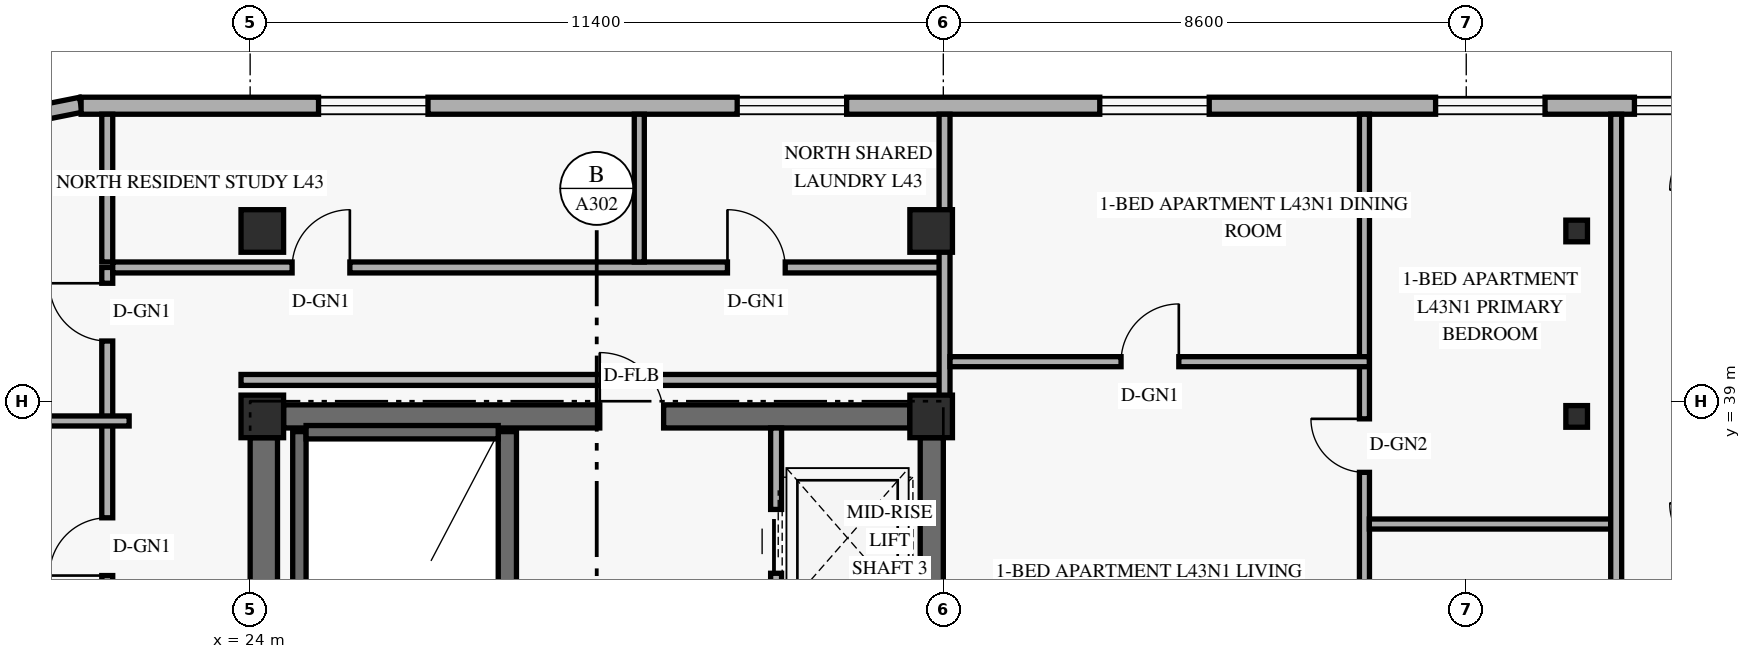
"""IFC4 building model, lengths in metres.
Left out: names, types, materials, properties, quantities, classifications, styles, units other than length and angle.
Written with IfcOpenShell. Run it as: python <this file> out.ifc"""

import sys

from ifc_helpers import new_model, si_unit, direction, frame, frame_2d, origin, origin_2d, place, context, subcontext, project, spatial, rectangle, hollow_rectangle, extrude, element, fill, save


model = new_model("IFC4")
c1 = context("Model", 3, precision=1e-05, world=origin(), true_north=direction((0.0, 1.0)))
c2 = subcontext(c1, "Body", "Model", "MODEL_VIEW")
j1 = project(units=[si_unit("LENGTHUNIT", "METRE"), si_unit("PLANEANGLEUNIT", "RADIAN")], contexts=[c1])
p1 = place(None, origin())
s1 = spatial("IfcSite", under=j1, at=p1, CompositionType="ELEMENT")
p2 = place(p1, origin())
s2 = spatial("IfcBuilding", under=s1, at=p2, CompositionType="ELEMENT")
p3 = place(p2, frame((0.0, 0.0, 166.2)))
s3 = spatial("IfcBuildingStorey", under=s2, at=p3, CompositionType="ELEMENT", Elevation=166.2)
p4 = place(p3, frame((24.225, 30.55, 0.0), z_axis=(0.0, 0.0, 1.0), x_axis=(0.0, 1.0, 0.0)))
e1 = element("IfcWall", 1, at=p4, inside=s3, PredefinedType="SHEAR", context=c2, shape_type="SweptSolid", body=[
    extrude(rectangle(XDim=7.85, YDim=0.45, at=frame_2d((3.925, 0.0))), origin(), (0.0, 0.0, 1.0), 2.748),
])
p5 = place(p3, frame((35.21, 31.35, 0.0), z_axis=(0.0, 0.0, 1.0), x_axis=(0.0, 1.0, 0.0)))
e2 = element("IfcWall", 2, at=p5, inside=s3, PredefinedType="SHEAR", context=c2, shape_type="SweptSolid", body=[
    extrude(rectangle(XDim=7.05, YDim=0.38, at=frame_2d((3.525, 0.0))), origin(), (0.0, 0.0, 1.0), 2.748),
])
p6 = place(p3, frame((24.55, 38.75, 0.0), z_axis=(0.0, 0.0, 1.0), x_axis=(1.0, 0.0, 0.0)))
e3 = element("IfcWall", 3, at=p6, inside=s3, PredefinedType="SHEAR", context=c2, shape_type="SweptSolid", body=[
    extrude(rectangle(XDim=10.3, YDim=0.38, at=frame_2d((5.15, 0.0))), origin(), (0.0, 0.0, 1.0), 3.36),
])
p7 = place(p6, frame((5.2, 0.0, 0.0)))
e4 = element("IfcOpeningElement", 4, at=p7, cuts=e3, PredefinedType="OPENING", context=c2, shape_type="SweptSolid", body=[
    extrude(rectangle(XDim=1.05, YDim=2.15, at=frame_2d((0.525, 1.075))), frame((0.0, 0.2, 0.0), z_axis=(0.0, -1.0, 0.0), x_axis=(1.0, 0.0, 0.0)), (0.0, 0.0, 1.0), 0.4),
])
p8 = place(p3, frame((24.81, 30.74, 0.0), z_axis=(0.0, 0.0, 1.0), x_axis=(0.0, 1.0, 0.0)))
e5 = element("IfcWall", 5, at=p8, inside=s3, PredefinedType="SHEAR", context=c2, shape_type="SweptSolid", body=[
    extrude(rectangle(XDim=7.76, YDim=0.22, at=frame_2d((3.88, 0.0))), origin(), (0.0, 0.0, 1.0), 3.36),
])
p9 = place(p3, frame((28.23, 30.74, 0.0), z_axis=(0.0, 0.0, 1.0), x_axis=(0.0, 1.0, 0.0)))
e6 = element("IfcWall", 6, at=p9, inside=s3, PredefinedType="SHEAR", context=c2, shape_type="SweptSolid", body=[
    extrude(rectangle(XDim=7.76, YDim=0.3, at=frame_2d((3.88, 0.0))), origin(), (0.0, 0.0, 1.0), 3.36),
])
p10 = place(p3, frame((24.92, 38.49, 0.0), z_axis=(0.0, 0.0, 1.0), x_axis=(1.0, 0.0, 0.0)))
e7 = element("IfcWall", 7, at=p10, inside=s3, PredefinedType="SHEAR", context=c2, shape_type="SweptSolid", body=[
    extrude(rectangle(XDim=3.16, YDim=0.22, at=frame_2d((1.58, 0.0))), origin(), (0.0, 0.0, 1.0), 3.36),
])
for number, where, z_axis, x_axis in (
    (8, (24.2, 38.75, 0.0), (0.0, 0.0, 1.0), (1.0, 0.0, 0.0)),
    (9, (24.2, 41.8, 0.0), (0.0, 0.0, 1.0), (1.0, 0.0, 0.0)),
    (10, (35.2, 38.75, 0.0), (0.0, 0.0, 1.0), (1.0, 0.0, 0.0)),
    (11, (35.2, 41.8, 0.0), (0.0, 0.0, 1.0), (1.0, 0.0, 0.0)),
):
    element("IfcColumn", number, at=place(p3, frame(where, z_axis=z_axis, x_axis=x_axis)), inside=s3, PredefinedType="COLUMN", context=c2, shape_type="SweptSolid", body=[
        extrude(rectangle(XDim=0.7, YDim=0.7, at=origin_2d()), origin(), (0.0, 0.0, 1.0), 3.6),
    ])
for number, where, z_axis, x_axis in (
    (12, (45.753, 38.75, 0.0), (0.035, 0.0, 0.999), (0.0, 1.0, 0.0)),
    (13, (45.753, 41.8, 0.0), (0.035, 0.0, 0.999), (0.0, 1.0, 0.0)),
):
    element("IfcColumn", number, at=place(p3, frame(where, z_axis=z_axis, x_axis=x_axis)), inside=s3, PredefinedType="COLUMN", context=c2, shape_type="SweptSolid", body=[
        extrude(hollow_rectangle(XDim=0.356, YDim=0.356, WallThickness=0.016, at=origin_2d()), origin(), (0.0, 0.0, 1.0), 3.602),
    ])
p11 = place(p3, frame((21.217, 43.876, 0.0), z_axis=(0.0, 0.0, 1.0), x_axis=(-0.980809899341, -0.19496651342, 0.0)))
e14 = element("IfcWall", 14, at=p11, inside=s3, PredefinedType="SOLIDWALL", context=c2, shape_type="SweptSolid", body=[
    extrude(rectangle(XDim=1.389, YDim=0.25, at=frame_2d((0.694, 0.0))), origin(), (0.0, 0.0, 1.0), 3.36),
])
p12 = place(p3, frame((54.98, 43.86, 0.0), z_axis=(0.0, 0.0, 1.0), x_axis=(-1.0, 0.0, 0.0)))
e15 = element("IfcWall", 15, at=p12, inside=s3, PredefinedType="SOLIDWALL", context=c2, shape_type="SweptSolid", body=[
    extrude(rectangle(XDim=33.76, YDim=0.28, at=frame_2d((16.88, 0.0))), origin(), (0.0, 0.0, 1.0), 3.36),
])
p13 = place(p12, frame((28.055, 0.0, 0.85)))
e16 = element("IfcOpeningElement", 16, at=p13, cuts=e15, PredefinedType="OPENING", context=c2, shape_type="SweptSolid", body=[
    extrude(rectangle(XDim=1.8, YDim=1.6, at=frame_2d((0.9, 0.8))), frame((0.0, 0.15, 0.0), z_axis=(0.0, -1.0, 0.0), x_axis=(1.0, 0.0, 0.0)), (0.0, 0.0, 1.0), 0.3),
])
p14 = place(p12, frame((21.17, 0.0, 0.85)))
e17 = element("IfcOpeningElement", 17, at=p14, cuts=e15, PredefinedType="OPENING", context=c2, shape_type="SweptSolid", body=[
    extrude(rectangle(XDim=1.8, YDim=1.6, at=frame_2d((0.9, 0.8))), frame((0.0, 0.15, 0.0), z_axis=(0.0, -1.0, 0.0), x_axis=(1.0, 0.0, 0.0)), (0.0, 0.0, 1.0), 0.3),
])
p15 = place(p12, frame((15.207, 0.0, 0.85)))
e18 = element("IfcOpeningElement", 18, at=p15, cuts=e15, PredefinedType="OPENING", context=c2, shape_type="SweptSolid", body=[
    extrude(rectangle(XDim=1.8, YDim=1.6, at=frame_2d((0.9, 0.8))), frame((0.0, 0.15, 0.0), z_axis=(0.0, -1.0, 0.0), x_axis=(1.0, 0.0, 0.0)), (0.0, 0.0, 1.0), 0.3),
])
p16 = place(p12, frame((9.684, 0.0, 0.85)))
e19 = element("IfcOpeningElement", 19, at=p16, cuts=e15, PredefinedType="OPENING", context=c2, shape_type="SweptSolid", body=[
    extrude(rectangle(XDim=1.8, YDim=1.6, at=frame_2d((0.9, 0.8))), frame((0.0, 0.15, 0.0), z_axis=(0.0, -1.0, 0.0), x_axis=(1.0, 0.0, 0.0)), (0.0, 0.0, 1.0), 0.3),
])
p17 = place(p12, frame((7.014, 0.0, 0.85)))
e20 = element("IfcOpeningElement", 20, at=p17, cuts=e15, PredefinedType="OPENING", context=c2, shape_type="SweptSolid", body=[
    extrude(rectangle(XDim=1.2, YDim=1.5, at=frame_2d((0.6, 0.75))), frame((0.0, 0.15, 0.0), z_axis=(0.0, -1.0, 0.0), x_axis=(1.0, 0.0, 0.0)), (0.0, 0.0, 1.0), 0.3),
])
p18 = place(p12, frame((2.457, 0.0, 0.85)))
e21 = element("IfcOpeningElement", 21, at=p18, cuts=e15, PredefinedType="OPENING", context=c2, shape_type="SweptSolid", body=[
    extrude(rectangle(XDim=1.8, YDim=1.6, at=frame_2d((0.9, 0.8))), frame((0.0, 0.15, 0.0), z_axis=(0.0, -1.0, 0.0), x_axis=(1.0, 0.0, 0.0)), (0.0, 0.0, 1.0), 0.3),
])
p19 = place(p3, frame((32.65, 31.35, 0.0), z_axis=(0.0, 0.0, 1.0), x_axis=(0.0, 1.0, 0.0)))
e22 = element("IfcWall", 22, at=p19, inside=s3, PredefinedType="STANDARD", context=c2, shape_type="SweptSolid", body=[
    extrude(rectangle(XDim=7.21, YDim=0.18, at=frame_2d((3.605, 0.0))), origin(), (0.0, 0.0, 1.0), 3.36),
])
p20 = place(p19, frame((0.52, 0.0, 0.0)))
e23 = element("IfcOpeningElement", 23, at=p20, cuts=e22, PredefinedType="OPENING", context=c2, shape_type="SweptSolid", body=[
    extrude(rectangle(XDim=1.05, YDim=2.2, at=frame_2d((0.525, 1.1))), frame((0.0, 0.1, 0.0), z_axis=(0.0, -1.0, 0.0), x_axis=(1.0, 0.0, 0.0)), (0.0, 0.0, 1.0), 0.2),
])
p21 = place(p19, frame((2.67, 0.0, 0.0)))
e24 = element("IfcOpeningElement", 24, at=p21, cuts=e22, PredefinedType="OPENING", context=c2, shape_type="SweptSolid", body=[
    extrude(rectangle(XDim=1.05, YDim=2.2, at=frame_2d((0.525, 1.1))), frame((0.0, 0.1, 0.0), z_axis=(0.0, -1.0, 0.0), x_axis=(1.0, 0.0, 0.0)), (0.0, 0.0, 1.0), 0.2),
])
p22 = place(p19, frame((4.82, 0.0, 0.0)))
e25 = element("IfcOpeningElement", 25, at=p22, cuts=e22, PredefinedType="OPENING", context=c2, shape_type="SweptSolid", body=[
    extrude(rectangle(XDim=1.05, YDim=2.2, at=frame_2d((0.525, 1.1))), frame((0.0, 0.1, 0.0), z_axis=(0.0, -1.0, 0.0), x_axis=(1.0, 0.0, 0.0)), (0.0, 0.0, 1.0), 0.2),
])
p23 = place(p3, frame((21.65, 6.8, 0.0), z_axis=(0.0, 0.0, 1.0), x_axis=(0.0, 1.0, 0.0)))
e26 = element("IfcWall", 26, at=p23, inside=s3, PredefinedType="STANDARD", context=c2, shape_type="SweptSolid", body=[
    extrude(rectangle(XDim=34.4, YDim=0.18, at=frame_2d((17.2, 0.0))), origin(), (0.0, 0.0, 1.0), 2.73),
])
p24 = place(p23, frame((0.3, 0.0, 0.0)))
e27 = element("IfcOpeningElement", 27, at=p24, cuts=e26, PredefinedType="OPENING", context=c2, shape_type="SweptSolid", body=[
    extrude(rectangle(XDim=0.95, YDim=2.15, at=frame_2d((0.475, 1.075))), frame((0.0, 0.1, 0.0), z_axis=(0.0, -1.0, 0.0), x_axis=(1.0, 0.0, 0.0)), (0.0, 0.0, 1.0), 0.2),
])
p25 = place(p23, frame((3.718, 0.0, 0.0)))
e28 = element("IfcOpeningElement", 28, at=p25, cuts=e26, PredefinedType="OPENING", context=c2, shape_type="SweptSolid", body=[
    extrude(rectangle(XDim=0.95, YDim=2.15, at=frame_2d((0.475, 1.075))), frame((0.0, 0.1, 0.0), z_axis=(0.0, -1.0, 0.0), x_axis=(1.0, 0.0, 0.0)), (0.0, 0.0, 1.0), 0.2),
])
p26 = place(p23, frame((8.995, 0.0, 0.0)))
e29 = element("IfcOpeningElement", 29, at=p26, cuts=e26, PredefinedType="OPENING", context=c2, shape_type="SweptSolid", body=[
    extrude(rectangle(XDim=0.95, YDim=2.15, at=frame_2d((0.475, 1.075))), frame((0.0, 0.1, 0.0), z_axis=(0.0, -1.0, 0.0), x_axis=(1.0, 0.0, 0.0)), (0.0, 0.0, 1.0), 0.2),
])
p27 = place(p23, frame((14.105, 0.0, 0.0)))
e30 = element("IfcOpeningElement", 30, at=p27, cuts=e26, PredefinedType="OPENING", context=c2, shape_type="SweptSolid", body=[
    extrude(rectangle(XDim=0.95, YDim=2.15, at=frame_2d((0.475, 1.075))), frame((0.0, 0.1, 0.0), z_axis=(0.0, -1.0, 0.0), x_axis=(1.0, 0.0, 0.0)), (0.0, 0.0, 1.0), 0.2),
])
p28 = place(p23, frame((19.62, 0.0, 0.0)))
e31 = element("IfcOpeningElement", 31, at=p28, cuts=e26, PredefinedType="OPENING", context=c2, shape_type="SweptSolid", body=[
    extrude(rectangle(XDim=0.95, YDim=2.15, at=frame_2d((0.475, 1.075))), frame((0.0, 0.1, 0.0), z_axis=(0.0, -1.0, 0.0), x_axis=(1.0, 0.0, 0.0)), (0.0, 0.0, 1.0), 0.2),
])
p29 = place(p23, frame((24.73, 0.0, 0.0)))
e32 = element("IfcOpeningElement", 32, at=p29, cuts=e26, PredefinedType="OPENING", context=c2, shape_type="SweptSolid", body=[
    extrude(rectangle(XDim=0.95, YDim=2.15, at=frame_2d((0.475, 1.075))), frame((0.0, 0.1, 0.0), z_axis=(0.0, -1.0, 0.0), x_axis=(1.0, 0.0, 0.0)), (0.0, 0.0, 1.0), 0.2),
])
p30 = place(p23, frame((29.333, 0.0, 0.0)))
e33 = element("IfcOpeningElement", 33, at=p30, cuts=e26, PredefinedType="OPENING", context=c2, shape_type="SweptSolid", body=[
    extrude(rectangle(XDim=0.95, YDim=2.15, at=frame_2d((0.475, 1.075))), frame((0.0, 0.1, 0.0), z_axis=(0.0, -1.0, 0.0), x_axis=(1.0, 0.0, 0.0)), (0.0, 0.0, 1.0), 0.2),
])
p31 = place(p23, frame((33.19, 0.0, 0.0)))
e34 = element("IfcOpeningElement", 34, at=p31, cuts=e26, PredefinedType="OPENING", context=c2, shape_type="SweptSolid", body=[
    extrude(rectangle(XDim=0.95, YDim=2.15, at=frame_2d((0.475, 1.075))), frame((0.0, 0.1, 0.0), z_axis=(0.0, -1.0, 0.0), x_axis=(1.0, 0.0, 0.0)), (0.0, 0.0, 1.0), 0.2),
])
p32 = place(p3, frame((21.74, 41.2, 0.0), z_axis=(0.0, 0.0, 1.0), x_axis=(1.0, 0.0, 0.0)))
e35 = element("IfcWall", 35, at=p32, inside=s3, PredefinedType="STANDARD", context=c2, shape_type="SweptSolid", body=[
    extrude(rectangle(XDim=13.68, YDim=0.18, at=frame_2d((6.84, 0.0))), origin(), (0.0, 0.0, 1.0), 2.73),
])
p33 = place(p32, frame((2.95, 0.0, 0.0)))
e36 = element("IfcOpeningElement", 36, at=p33, cuts=e35, PredefinedType="OPENING", context=c2, shape_type="SweptSolid", body=[
    extrude(rectangle(XDim=0.95, YDim=2.15, at=frame_2d((0.475, 1.075))), frame((0.0, 0.1, 0.0), z_axis=(0.0, -1.0, 0.0), x_axis=(1.0, 0.0, 0.0)), (0.0, 0.0, 1.0), 0.2),
])
p34 = place(p32, frame((10.11, 0.0, 0.0)))
e37 = element("IfcOpeningElement", 37, at=p34, cuts=e35, PredefinedType="OPENING", context=c2, shape_type="SweptSolid", body=[
    extrude(rectangle(XDim=0.95, YDim=2.15, at=frame_2d((0.475, 1.075))), frame((0.0, 0.1, 0.0), z_axis=(0.0, -1.0, 0.0), x_axis=(1.0, 0.0, 0.0)), (0.0, 0.0, 1.0), 0.2),
])
p35 = place(p3, frame((23.85, 39.35, 0.0), z_axis=(0.0, 0.0, 1.0), x_axis=(1.0, 0.0, 0.0)))
e38 = element("IfcWall", 38, at=p35, inside=s3, PredefinedType="STANDARD", context=c2, shape_type="SweptSolid", body=[
    extrude(rectangle(XDim=11.57, YDim=0.18, at=frame_2d((5.785, 0.0))), origin(), (0.0, 0.0, 1.0), 2.73),
])
p36 = place(p3, frame((21.65, 41.29, 0.0), z_axis=(0.0, 0.0, 1.0), x_axis=(0.0, 1.0, 0.0)))
e39 = element("IfcWall", 39, at=p36, inside=s3, PredefinedType="PARTITIONING", context=c2, shape_type="SweptSolid", body=[
    extrude(rectangle(XDim=2.43, YDim=0.18, at=frame_2d((1.215, 0.0))), origin(), (0.0, 0.0, 1.0), 2.879),
])
p37 = place(p3, frame((35.42, 38.75, 0.0), z_axis=(0.0, 0.0, 1.0), x_axis=(0.0, 1.0, 0.0)))
e40 = element("IfcWall", 40, at=p37, inside=s3, PredefinedType="PARTITIONING", context=c2, shape_type="SweptSolid", body=[
    extrude(rectangle(XDim=4.97, YDim=0.18, at=frame_2d((2.485, 0.0))), origin(), (0.0, 0.0, 1.0), 2.73),
])
p38 = place(p3, frame((42.326, 29.55, 0.0), z_axis=(0.0, 0.0, 1.0), x_axis=(0.0, 1.0, 0.0)))
e41 = element("IfcWall", 41, at=p38, inside=s3, PredefinedType="PARTITIONING", context=c2, shape_type="SweptSolid", body=[
    extrude(rectangle(XDim=14.17, YDim=0.165, at=frame_2d((7.085, 0.0))), origin(), (0.0, 0.0, 1.0), 2.73),
])
p39 = place(p38, frame((4.593, 0.0, 0.0)))
e42 = element("IfcOpeningElement", 42, at=p39, cuts=e41, PredefinedType="OPENING", context=c2, shape_type="SweptSolid", body=[
    extrude(rectangle(XDim=0.88, YDim=2.14, at=frame_2d((0.44, 1.07))), frame((0.0, 0.093, 0.0), z_axis=(0.0, -1.0, 0.0), x_axis=(1.0, 0.0, 0.0)), (0.0, 0.0, 1.0), 0.185),
])
p40 = place(p38, frame((8.28, 0.0, 0.0)))
e43 = element("IfcOpeningElement", 43, at=p40, cuts=e41, PredefinedType="OPENING", context=c2, shape_type="SweptSolid", body=[
    extrude(rectangle(XDim=0.88, YDim=2.12, at=frame_2d((0.44, 1.06))), frame((0.0, 0.093, 0.0), z_axis=(0.0, -1.0, 0.0), x_axis=(1.0, 0.0, 0.0)), (0.0, 0.0, 1.0), 0.185),
])
p41 = place(p3, frame((35.51, 39.65, 0.0), z_axis=(0.0, 0.0, 1.0), x_axis=(1.0, 0.0, 0.0)))
e44 = element("IfcWall", 44, at=p41, inside=s3, PredefinedType="PARTITIONING", context=c2, shape_type="SweptSolid", body=[
    extrude(rectangle(XDim=6.896, YDim=0.165, at=frame_2d((3.448, 0.0))), origin(), (0.0, 0.0, 1.0), 3.36),
])
p42 = place(p41, frame((2.813, 0.0, 0.0)))
e45 = element("IfcOpeningElement", 45, at=p42, cuts=e44, PredefinedType="OPENING", context=c2, shape_type="SweptSolid", body=[
    extrude(rectangle(XDim=0.95, YDim=2.15, at=frame_2d((0.475, 1.075))), frame((0.0, 0.093, 0.0), z_axis=(0.0, -1.0, 0.0), x_axis=(1.0, 0.0, 0.0)), (0.0, 0.0, 1.0), 0.185),
])
p43 = place(p3, frame((42.406, 36.98, 0.0), z_axis=(0.0, 0.0, 1.0), x_axis=(1.0, 0.0, 0.0)))
e46 = element("IfcWall", 46, at=p43, inside=s3, PredefinedType="PARTITIONING", context=c2, shape_type="SweptSolid", body=[
    extrude(rectangle(XDim=3.97, YDim=0.165, at=frame_2d((1.985, 0.0))), origin(), (0.0, 0.0, 1.0), 2.73),
])
p44 = place(p3, frame((46.466, 29.55, 0.0), z_axis=(0.0, 0.0, 1.0), x_axis=(0.0, 1.0, 0.0)))
e47 = element("IfcWall", 47, at=p44, inside=s3, PredefinedType="STANDARD", context=c2, shape_type="SweptSolid", body=[
    extrude(rectangle(XDim=14.17, YDim=0.18, at=frame_2d((7.085, 0.0))), origin(), (0.0, 0.0, 1.0), 2.73),
])
p45 = place(p3, frame((17.88, 38.675, 0.0), z_axis=(0.0, 0.0, 1.0), x_axis=(1.0, 0.0, 0.0)))
e48 = element("IfcWall", 48, at=p45, inside=s3, PredefinedType="PARTITIONING", context=c2, shape_type="SweptSolid", body=[
    extrude(rectangle(XDim=4.13, YDim=0.165, at=frame_2d((2.065, 0.0))), origin(), (0.0, 0.0, 1.0), 2.73),
])
p46 = place(p3, frame((30.4, 41.29, 0.0), z_axis=(0.0, 0.0, 1.0), x_axis=(0.0, 1.0, 0.0)))
e49 = element("IfcWall", 49, at=p46, inside=s3, PredefinedType="PARTITIONING", context=c2, shape_type="SweptSolid", body=[
    extrude(rectangle(XDim=2.43, YDim=0.165, at=frame_2d((1.215, 0.0))), origin(), (0.0, 0.0, 1.0), 2.879),
])
p47 = place(p13, origin())
e50 = element("IfcWindow", 50, at=p47, inside=s3, PartitioningType="SINGLE_PANEL", PredefinedType="WINDOW", context=c2, shape_type="SweptSolid", body=[
    extrude(rectangle(XDim=1.8, YDim=1.6, at=frame_2d((0.9, 0.8))), frame((0.0, 0.03, 0.0), z_axis=(0.0, -1.0, 0.0), x_axis=(1.0, 0.0, 0.0)), (0.0, 0.0, 1.0), 0.06),
])
fill(e16, e50)
p48 = place(p14, origin())
e51 = element("IfcWindow", 51, at=p48, inside=s3, PartitioningType="SINGLE_PANEL", PredefinedType="WINDOW", context=c2, shape_type="SweptSolid", body=[
    extrude(rectangle(XDim=1.8, YDim=1.6, at=frame_2d((0.9, 0.8))), frame((0.0, 0.03, 0.0), z_axis=(0.0, -1.0, 0.0), x_axis=(1.0, 0.0, 0.0)), (0.0, 0.0, 1.0), 0.06),
])
fill(e17, e51)
p49 = place(p15, origin())
e52 = element("IfcWindow", 52, at=p49, inside=s3, PartitioningType="SINGLE_PANEL", PredefinedType="WINDOW", context=c2, shape_type="SweptSolid", body=[
    extrude(rectangle(XDim=1.8, YDim=1.6, at=frame_2d((0.9, 0.8))), frame((0.0, 0.03, 0.0), z_axis=(0.0, -1.0, 0.0), x_axis=(1.0, 0.0, 0.0)), (0.0, 0.0, 1.0), 0.06),
])
fill(e18, e52)
p50 = place(p16, origin())
e53 = element("IfcWindow", 53, at=p50, inside=s3, PartitioningType="SINGLE_PANEL", PredefinedType="WINDOW", context=c2, shape_type="SweptSolid", body=[
    extrude(rectangle(XDim=1.8, YDim=1.6, at=frame_2d((0.9, 0.8))), frame((0.0, 0.03, 0.0), z_axis=(0.0, -1.0, 0.0), x_axis=(1.0, 0.0, 0.0)), (0.0, 0.0, 1.0), 0.06),
])
fill(e19, e53)
p51 = place(p17, origin())
e54 = element("IfcWindow", 54, at=p51, inside=s3, PartitioningType="SINGLE_PANEL", PredefinedType="WINDOW", context=c2, shape_type="SweptSolid", body=[
    extrude(rectangle(XDim=1.2, YDim=1.5, at=frame_2d((0.6, 0.75))), frame((0.0, 0.03, 0.0), z_axis=(0.0, -1.0, 0.0), x_axis=(1.0, 0.0, 0.0)), (0.0, 0.0, 1.0), 0.06),
])
fill(e20, e54)
p52 = place(p22, origin())
e55 = element("IfcDoor", 55, at=p52, inside=s3, OperationType="SLIDING_TO_LEFT", PredefinedType="DOOR", context=c2, shape_type="SweptSolid", body=[
    extrude(rectangle(XDim=1.05, YDim=2.2, at=frame_2d((0.525, 1.1))), frame((0.0, 0.025, 0.0), z_axis=(0.0, -1.0, 0.0), x_axis=(1.0, 0.0, 0.0)), (0.0, 0.0, 1.0), 0.05),
])
fill(e25, e55)
p53 = place(p7, frame((1.05, 0.0, 0.0), z_axis=(0.0, 0.0, 1.0), x_axis=(-1.0, 0.0, 0.0)))
e56 = element("IfcDoor", 56, at=p53, inside=s3, OperationType="SINGLE_SWING_RIGHT", PredefinedType="DOOR", context=c2, shape_type="SweptSolid", body=[
    extrude(rectangle(XDim=1.05, YDim=2.15, at=frame_2d((0.525, 1.075))), frame((0.0, 0.025, 0.0), z_axis=(0.0, -1.0, 0.0), x_axis=(1.0, 0.0, 0.0)), (0.0, 0.0, 1.0), 0.05),
])
fill(e4, e56)
p54 = place(p42, origin())
e57 = element("IfcDoor", 57, at=p54, inside=s3, OperationType="SINGLE_SWING_RIGHT", PredefinedType="DOOR", context=c2, shape_type="SweptSolid", body=[
    extrude(rectangle(XDim=0.95, YDim=2.15, at=frame_2d((0.475, 1.075))), frame((0.0, 0.025, 0.0), z_axis=(0.0, -1.0, 0.0), x_axis=(1.0, 0.0, 0.0)), (0.0, 0.0, 1.0), 0.05),
])
fill(e45, e57)
p55 = place(p40, origin())
e58 = element("IfcDoor", 58, at=p55, inside=s3, OperationType="SINGLE_SWING_RIGHT", PredefinedType="DOOR", context=c2, shape_type="SweptSolid", body=[
    extrude(rectangle(XDim=0.88, YDim=2.12, at=frame_2d((0.44, 1.06))), frame((0.0, 0.025, 0.0), z_axis=(0.0, -1.0, 0.0), x_axis=(1.0, 0.0, 0.0)), (0.0, 0.0, 1.0), 0.05),
])
fill(e43, e58)
p56 = place(p30, origin())
e59 = element("IfcDoor", 59, at=p56, inside=s3, OperationType="SINGLE_SWING_LEFT", PredefinedType="DOOR", context=c2, shape_type="SweptSolid", body=[
    extrude(rectangle(XDim=0.95, YDim=2.15, at=frame_2d((0.475, 1.075))), frame((0.0, 0.025, 0.0), z_axis=(0.0, -1.0, 0.0), x_axis=(1.0, 0.0, 0.0)), (0.0, 0.0, 1.0), 0.05),
])
fill(e33, e59)
p57 = place(p31, origin())
e60 = element("IfcDoor", 60, at=p57, inside=s3, OperationType="SINGLE_SWING_RIGHT", PredefinedType="DOOR", context=c2, shape_type="SweptSolid", body=[
    extrude(rectangle(XDim=0.95, YDim=2.15, at=frame_2d((0.475, 1.075))), frame((0.0, 0.025, 0.0), z_axis=(0.0, -1.0, 0.0), x_axis=(1.0, 0.0, 0.0)), (0.0, 0.0, 1.0), 0.05),
])
fill(e34, e60)
p58 = place(p33, origin())
e61 = element("IfcDoor", 61, at=p58, inside=s3, OperationType="SINGLE_SWING_RIGHT", PredefinedType="DOOR", context=c2, shape_type="SweptSolid", body=[
    extrude(rectangle(XDim=0.95, YDim=2.15, at=frame_2d((0.475, 1.075))), frame((0.0, 0.025, 0.0), z_axis=(0.0, -1.0, 0.0), x_axis=(1.0, 0.0, 0.0)), (0.0, 0.0, 1.0), 0.05),
])
fill(e36, e61)
p59 = place(p34, origin())
e62 = element("IfcDoor", 62, at=p59, inside=s3, OperationType="SINGLE_SWING_LEFT", PredefinedType="DOOR", context=c2, shape_type="SweptSolid", body=[
    extrude(rectangle(XDim=0.95, YDim=2.15, at=frame_2d((0.475, 1.075))), frame((0.0, 0.025, 0.0), z_axis=(0.0, -1.0, 0.0), x_axis=(1.0, 0.0, 0.0)), (0.0, 0.0, 1.0), 0.05),
])
fill(e37, e62)
save(model, sys.argv[1])
